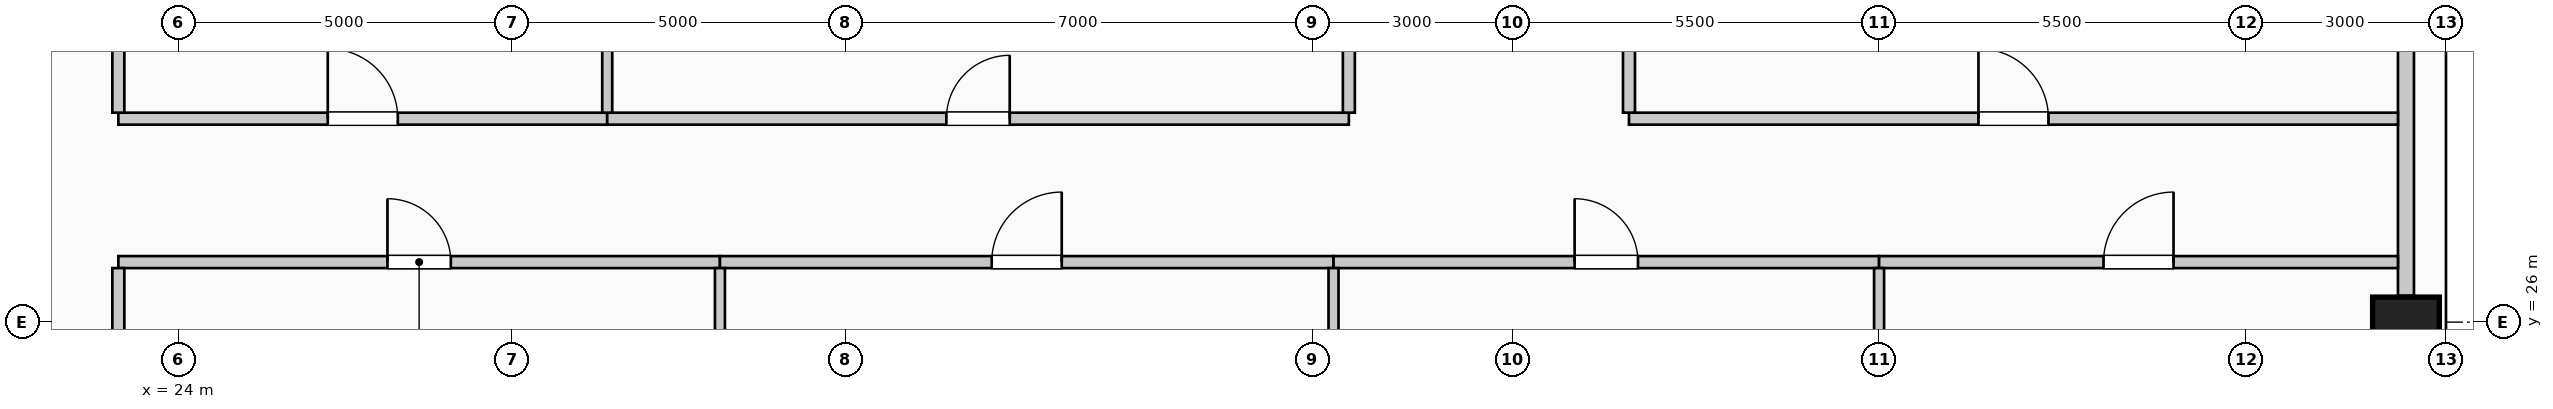
"""IFC4 building model, lengths in metres.
Left out: names, types, materials, properties, quantities, classifications, styles, units other than length and angle.
Written with IfcOpenShell. Run it as: python <this file> out.ifc"""

import sys

from ifc_helpers import new_model, si_unit, direction, frame, frame_2d, origin, origin_2d, place, context, subcontext, project, spatial, rectangle, extrude, element, fill, save


model = new_model("IFC4")
c1 = context("Model", 3, precision=1e-05, world=origin(), true_north=direction((0.0, 1.0)))
c2 = subcontext(c1, "Body", "Model", "MODEL_VIEW")
j1 = project(units=[si_unit("LENGTHUNIT", "METRE"), si_unit("PLANEANGLEUNIT", "RADIAN")], contexts=[c1])
p1 = place(None, origin())
s1 = spatial("IfcSite", under=j1, at=p1, CompositionType="ELEMENT")
p2 = place(p1, origin())
s2 = spatial("IfcBuilding", under=s1, at=p2, CompositionType="ELEMENT")
p3 = place(p2, frame((0.0, 0.0, 252.6)))
s3 = spatial("IfcBuildingStorey", under=s2, at=p3, CompositionType="ELEMENT", Elevation=252.6)
p4 = place(p3, frame((57.4, 26.0, 0.0), z_axis=(0.0, 0.0, 1.0), x_axis=(0.0, 1.0, 0.0)))
e1 = element("IfcColumn", 1, at=p4, inside=s3, PredefinedType="COLUMN", context=c2, shape_type="SweptSolid", body=[
    extrude(rectangle(XDim=0.75, YDim=1.0, at=origin_2d()), origin(), (0.0, 0.0, 1.0), 4.0),
])
p5 = place(p3, frame((57.4, 33.605, 0.0), z_axis=(0.0, 0.0, 1.0), x_axis=(0.0, -1.0, 0.0)))
e2 = element("IfcWall", 2, at=p5, inside=s3, PredefinedType="SOLIDWALL", context=c2, shape_type="SweptSolid", body=[
    extrude(rectangle(XDim=7.21, YDim=0.24, at=frame_2d((3.605, 0.0))), origin(), (0.0, 0.0, 1.0), 3.0),
])
p6 = place(p3, frame((23.1, 26.9, 0.0), z_axis=(0.0, 0.0, 1.0), x_axis=(1.0, 0.0, 0.0)))
e3 = element("IfcWall", 3, at=p6, inside=s3, PredefinedType="PARTITIONING", context=c2, shape_type="SweptSolid", body=[
    extrude(rectangle(XDim=9.02, YDim=0.18, at=frame_2d((4.51, 0.0))), origin(), (0.0, 0.0, 1.0), 3.75),
])
p7 = place(p6, frame((4.035, 0.0, 0.0)))
e4 = element("IfcOpeningElement", 4, at=p7, cuts=e3, PredefinedType="OPENING", context=c2, shape_type="SweptSolid", body=[
    extrude(rectangle(XDim=0.95, YDim=2.15, at=frame_2d((0.475, 1.075))), frame((0.0, 0.1, 0.0), z_axis=(0.0, -1.0, 0.0), x_axis=(1.0, 0.0, 0.0)), (0.0, 0.0, 1.0), 0.2),
])
p8 = place(p3, frame((32.12, 26.9, 0.0), z_axis=(0.0, 0.0, 1.0), x_axis=(1.0, 0.0, 0.0)))
e5 = element("IfcWall", 5, at=p8, inside=s3, PredefinedType="PARTITIONING", context=c2, shape_type="SweptSolid", body=[
    extrude(rectangle(XDim=9.2, YDim=0.18, at=frame_2d((4.6, 0.0))), origin(), (0.0, 0.0, 1.0), 3.75),
])
p9 = place(p8, frame((4.075, 0.0, 0.0)))
e6 = element("IfcOpeningElement", 6, at=p9, cuts=e5, PredefinedType="OPENING", context=c2, shape_type="SweptSolid", body=[
    extrude(rectangle(XDim=1.05, YDim=2.15, at=frame_2d((0.525, 1.075))), frame((0.0, 0.1, 0.0), z_axis=(0.0, -1.0, 0.0), x_axis=(1.0, 0.0, 0.0)), (0.0, 0.0, 1.0), 0.2),
])
p10 = place(p3, frame((41.32, 26.9, 0.0), z_axis=(0.0, 0.0, 1.0), x_axis=(1.0, 0.0, 0.0)))
e7 = element("IfcWall", 7, at=p10, inside=s3, PredefinedType="PARTITIONING", context=c2, shape_type="SweptSolid", body=[
    extrude(rectangle(XDim=8.18, YDim=0.18, at=frame_2d((4.09, 0.0))), origin(), (0.0, 0.0, 1.0), 3.75),
])
p11 = place(p10, frame((3.615, 0.0, 0.0)))
e8 = element("IfcOpeningElement", 8, at=p11, cuts=e7, PredefinedType="OPENING", context=c2, shape_type="SweptSolid", body=[
    extrude(rectangle(XDim=0.95, YDim=2.15, at=frame_2d((0.475, 1.075))), frame((0.0, 0.1, 0.0), z_axis=(0.0, -1.0, 0.0), x_axis=(1.0, 0.0, 0.0)), (0.0, 0.0, 1.0), 0.2),
])
p12 = place(p3, frame((49.5, 26.9, 0.0), z_axis=(0.0, 0.0, 1.0), x_axis=(1.0, 0.0, 0.0)))
e9 = element("IfcWall", 9, at=p12, inside=s3, PredefinedType="PARTITIONING", context=c2, shape_type="SweptSolid", body=[
    extrude(rectangle(XDim=7.78, YDim=0.18, at=frame_2d((3.89, 0.0))), origin(), (0.0, 0.0, 1.0), 3.75),
])
p13 = place(p12, frame((3.365, 0.0, 0.0)))
e10 = element("IfcOpeningElement", 10, at=p13, cuts=e9, PredefinedType="OPENING", context=c2, shape_type="SweptSolid", body=[
    extrude(rectangle(XDim=1.05, YDim=2.15, at=frame_2d((0.525, 1.075))), frame((0.0, 0.1, 0.0), z_axis=(0.0, -1.0, 0.0), x_axis=(1.0, 0.0, 0.0)), (0.0, 0.0, 1.0), 0.2),
])
p14 = place(p3, frame((23.1, 29.05, 0.0), z_axis=(0.0, 0.0, 1.0), x_axis=(1.0, 0.0, 0.0)))
e11 = element("IfcWall", 11, at=p14, inside=s3, PredefinedType="PARTITIONING", context=c2, shape_type="SweptSolid", body=[
    extrude(rectangle(XDim=7.33, YDim=0.18, at=frame_2d((3.665, 0.0))), origin(), (0.0, 0.0, 1.0), 3.75),
])
p15 = place(p14, frame((3.14, 0.0, 0.0)))
e12 = element("IfcOpeningElement", 12, at=p15, cuts=e11, PredefinedType="OPENING", context=c2, shape_type="SweptSolid", body=[
    extrude(rectangle(XDim=1.05, YDim=2.15, at=frame_2d((0.525, 1.075))), frame((0.0, 0.1, 0.0), z_axis=(0.0, -1.0, 0.0), x_axis=(1.0, 0.0, 0.0)), (0.0, 0.0, 1.0), 0.2),
])
p16 = place(p3, frame((30.43, 29.05, 0.0), z_axis=(0.0, 0.0, 1.0), x_axis=(1.0, 0.0, 0.0)))
e13 = element("IfcWall", 13, at=p16, inside=s3, PredefinedType="PARTITIONING", context=c2, shape_type="SweptSolid", body=[
    extrude(rectangle(XDim=11.12, YDim=0.18, at=frame_2d((5.56, 0.0))), origin(), (0.0, 0.0, 1.0), 3.75),
])
p17 = place(p16, frame((5.085, 0.0, 0.0)))
e14 = element("IfcOpeningElement", 14, at=p17, cuts=e13, PredefinedType="OPENING", context=c2, shape_type="SweptSolid", body=[
    extrude(rectangle(XDim=0.95, YDim=2.15, at=frame_2d((0.475, 1.075))), frame((0.0, 0.1, 0.0), z_axis=(0.0, -1.0, 0.0), x_axis=(1.0, 0.0, 0.0)), (0.0, 0.0, 1.0), 0.2),
])
p18 = place(p3, frame((45.75, 29.05, 0.0), z_axis=(0.0, 0.0, 1.0), x_axis=(1.0, 0.0, 0.0)))
e15 = element("IfcWall", 15, at=p18, inside=s3, PredefinedType="PARTITIONING", context=c2, shape_type="SweptSolid", body=[
    extrude(rectangle(XDim=11.53, YDim=0.18, at=frame_2d((5.765, 0.0))), origin(), (0.0, 0.0, 1.0), 3.75),
])
p19 = place(p18, frame((5.24, 0.0, 0.0)))
e16 = element("IfcOpeningElement", 16, at=p19, cuts=e15, PredefinedType="OPENING", context=c2, shape_type="SweptSolid", body=[
    extrude(rectangle(XDim=1.05, YDim=2.15, at=frame_2d((0.525, 1.075))), frame((0.0, 0.1, 0.0), z_axis=(0.0, -1.0, 0.0), x_axis=(1.0, 0.0, 0.0)), (0.0, 0.0, 1.0), 0.2),
])
p20 = place(p3, frame((23.1, 17.3, 0.0), z_axis=(0.0, 0.0, 1.0), x_axis=(0.0, 1.0, 0.0)))
e17 = element("IfcWall", 17, at=p20, inside=s3, PredefinedType="PARTITIONING", context=c2, shape_type="SweptSolid", body=[
    extrude(rectangle(XDim=9.51, YDim=0.18, at=frame_2d((4.755, 0.0))), origin(), (0.0, 0.0, 1.0), 3.75),
])
p21 = place(p3, frame((23.1, 29.14, 0.0), z_axis=(0.0, 0.0, 1.0), x_axis=(0.0, 1.0, 0.0)))
e18 = element("IfcWall", 18, at=p21, inside=s3, PredefinedType="PARTITIONING", context=c2, shape_type="SweptSolid", body=[
    extrude(rectangle(XDim=3.12, YDim=0.18, at=frame_2d((1.56, 0.0))), origin(), (0.0, 0.0, 1.0), 3.75),
])
p22 = place(p3, frame((30.43, 29.14, 0.0), z_axis=(0.0, 0.0, 1.0), x_axis=(0.0, 1.0, 0.0)))
e19 = element("IfcWall", 19, at=p22, inside=s3, PredefinedType="PARTITIONING", context=c2, shape_type="SweptSolid", body=[
    extrude(rectangle(XDim=16.14, YDim=0.15, at=frame_2d((8.07, 0.0))), origin(), (0.0, 0.0, 1.0), 3.75),
])
p23 = place(p3, frame((32.12, 0.72, 0.0), z_axis=(0.0, 0.0, 1.0), x_axis=(0.0, 1.0, 0.0)))
e20 = element("IfcWall", 20, at=p23, inside=s3, PredefinedType="PARTITIONING", context=c2, shape_type="SweptSolid", body=[
    extrude(rectangle(XDim=26.09, YDim=0.15, at=frame_2d((13.045, 0.0))), origin(), (0.0, 0.0, 1.0), 3.75),
])
p24 = place(p3, frame((41.32, 18.425, 0.0), z_axis=(0.0, 0.0, 1.0), x_axis=(0.0, 1.0, 0.0)))
e21 = element("IfcWall", 21, at=p24, inside=s3, PredefinedType="PARTITIONING", context=c2, shape_type="SweptSolid", body=[
    extrude(rectangle(XDim=8.385, YDim=0.15, at=frame_2d((4.192, 0.0))), origin(), (0.0, 0.0, 1.0), 3.195),
])
p25 = place(p3, frame((41.55, 29.14, 0.0), z_axis=(0.0, 0.0, 1.0), x_axis=(0.0, 1.0, 0.0)))
e22 = element("IfcWall", 22, at=p25, inside=s3, PredefinedType="PARTITIONING", context=c2, shape_type="SweptSolid", body=[
    extrude(rectangle(XDim=3.21, YDim=0.18, at=frame_2d((1.605, 0.0))), origin(), (0.0, 0.0, 1.0), 3.195),
])
p26 = place(p3, frame((45.75, 29.14, 0.0), z_axis=(0.0, 0.0, 1.0), x_axis=(0.0, 1.0, 0.0)))
e23 = element("IfcWall", 23, at=p26, inside=s3, PredefinedType="PARTITIONING", context=c2, shape_type="SweptSolid", body=[
    extrude(rectangle(XDim=3.135, YDim=0.18, at=frame_2d((1.567, 0.0))), origin(), (0.0, 0.0, 1.0), 3.75),
])
p27 = place(p3, frame((49.5, 1.1, 0.0), z_axis=(0.0, 0.0, 1.0), x_axis=(0.0, 1.0, 0.0)))
e24 = element("IfcWall", 24, at=p27, inside=s3, PredefinedType="PARTITIONING", context=c2, shape_type="SweptSolid", body=[
    extrude(rectangle(XDim=25.71, YDim=0.15, at=frame_2d((12.855, 0.0))), origin(), (0.0, 0.0, 1.0), 3.75),
])
p28 = place(p7, origin())
e25 = element("IfcDoor", 25, at=p28, inside=s3, OperationType="SINGLE_SWING_LEFT", PredefinedType="DOOR", context=c2, shape_type="SweptSolid", body=[
    extrude(rectangle(XDim=0.95, YDim=2.15, at=frame_2d((0.475, 1.075))), frame((0.0, 0.025, 0.0), z_axis=(0.0, -1.0, 0.0), x_axis=(1.0, 0.0, 0.0)), (0.0, 0.0, 1.0), 0.05),
])
fill(e4, e25)
p29 = place(p9, origin())
e26 = element("IfcDoor", 26, at=p29, inside=s3, OperationType="SINGLE_SWING_RIGHT", PredefinedType="DOOR", context=c2, shape_type="SweptSolid", body=[
    extrude(rectangle(XDim=1.05, YDim=2.15, at=frame_2d((0.525, 1.075))), frame((0.0, 0.025, 0.0), z_axis=(0.0, -1.0, 0.0), x_axis=(1.0, 0.0, 0.0)), (0.0, 0.0, 1.0), 0.05),
])
fill(e6, e26)
p30 = place(p11, origin())
e27 = element("IfcDoor", 27, at=p30, inside=s3, OperationType="SINGLE_SWING_LEFT", PredefinedType="DOOR", context=c2, shape_type="SweptSolid", body=[
    extrude(rectangle(XDim=0.95, YDim=2.15, at=frame_2d((0.475, 1.075))), frame((0.0, 0.025, 0.0), z_axis=(0.0, -1.0, 0.0), x_axis=(1.0, 0.0, 0.0)), (0.0, 0.0, 1.0), 0.05),
])
fill(e8, e27)
p31 = place(p13, origin())
e28 = element("IfcDoor", 28, at=p31, inside=s3, OperationType="SINGLE_SWING_RIGHT", PredefinedType="DOOR", context=c2, shape_type="SweptSolid", body=[
    extrude(rectangle(XDim=1.05, YDim=2.15, at=frame_2d((0.525, 1.075))), frame((0.0, 0.025, 0.0), z_axis=(0.0, -1.0, 0.0), x_axis=(1.0, 0.0, 0.0)), (0.0, 0.0, 1.0), 0.05),
])
fill(e10, e28)
p32 = place(p15, origin())
e29 = element("IfcDoor", 29, at=p32, inside=s3, OperationType="SINGLE_SWING_LEFT", PredefinedType="DOOR", context=c2, shape_type="SweptSolid", body=[
    extrude(rectangle(XDim=1.05, YDim=2.15, at=frame_2d((0.525, 1.075))), frame((0.0, 0.025, 0.0), z_axis=(0.0, -1.0, 0.0), x_axis=(1.0, 0.0, 0.0)), (0.0, 0.0, 1.0), 0.05),
])
fill(e12, e29)
p33 = place(p17, origin())
e30 = element("IfcDoor", 30, at=p33, inside=s3, OperationType="SINGLE_SWING_RIGHT", PredefinedType="DOOR", context=c2, shape_type="SweptSolid", body=[
    extrude(rectangle(XDim=0.95, YDim=2.15, at=frame_2d((0.475, 1.075))), frame((0.0, 0.025, 0.0), z_axis=(0.0, -1.0, 0.0), x_axis=(1.0, 0.0, 0.0)), (0.0, 0.0, 1.0), 0.05),
])
fill(e14, e30)
p34 = place(p19, origin())
e31 = element("IfcDoor", 31, at=p34, inside=s3, OperationType="SINGLE_SWING_LEFT", PredefinedType="DOOR", context=c2, shape_type="SweptSolid", body=[
    extrude(rectangle(XDim=1.05, YDim=2.15, at=frame_2d((0.525, 1.075))), frame((0.0, 0.025, 0.0), z_axis=(0.0, -1.0, 0.0), x_axis=(1.0, 0.0, 0.0)), (0.0, 0.0, 1.0), 0.05),
])
fill(e16, e31)
save(model, sys.argv[1])
